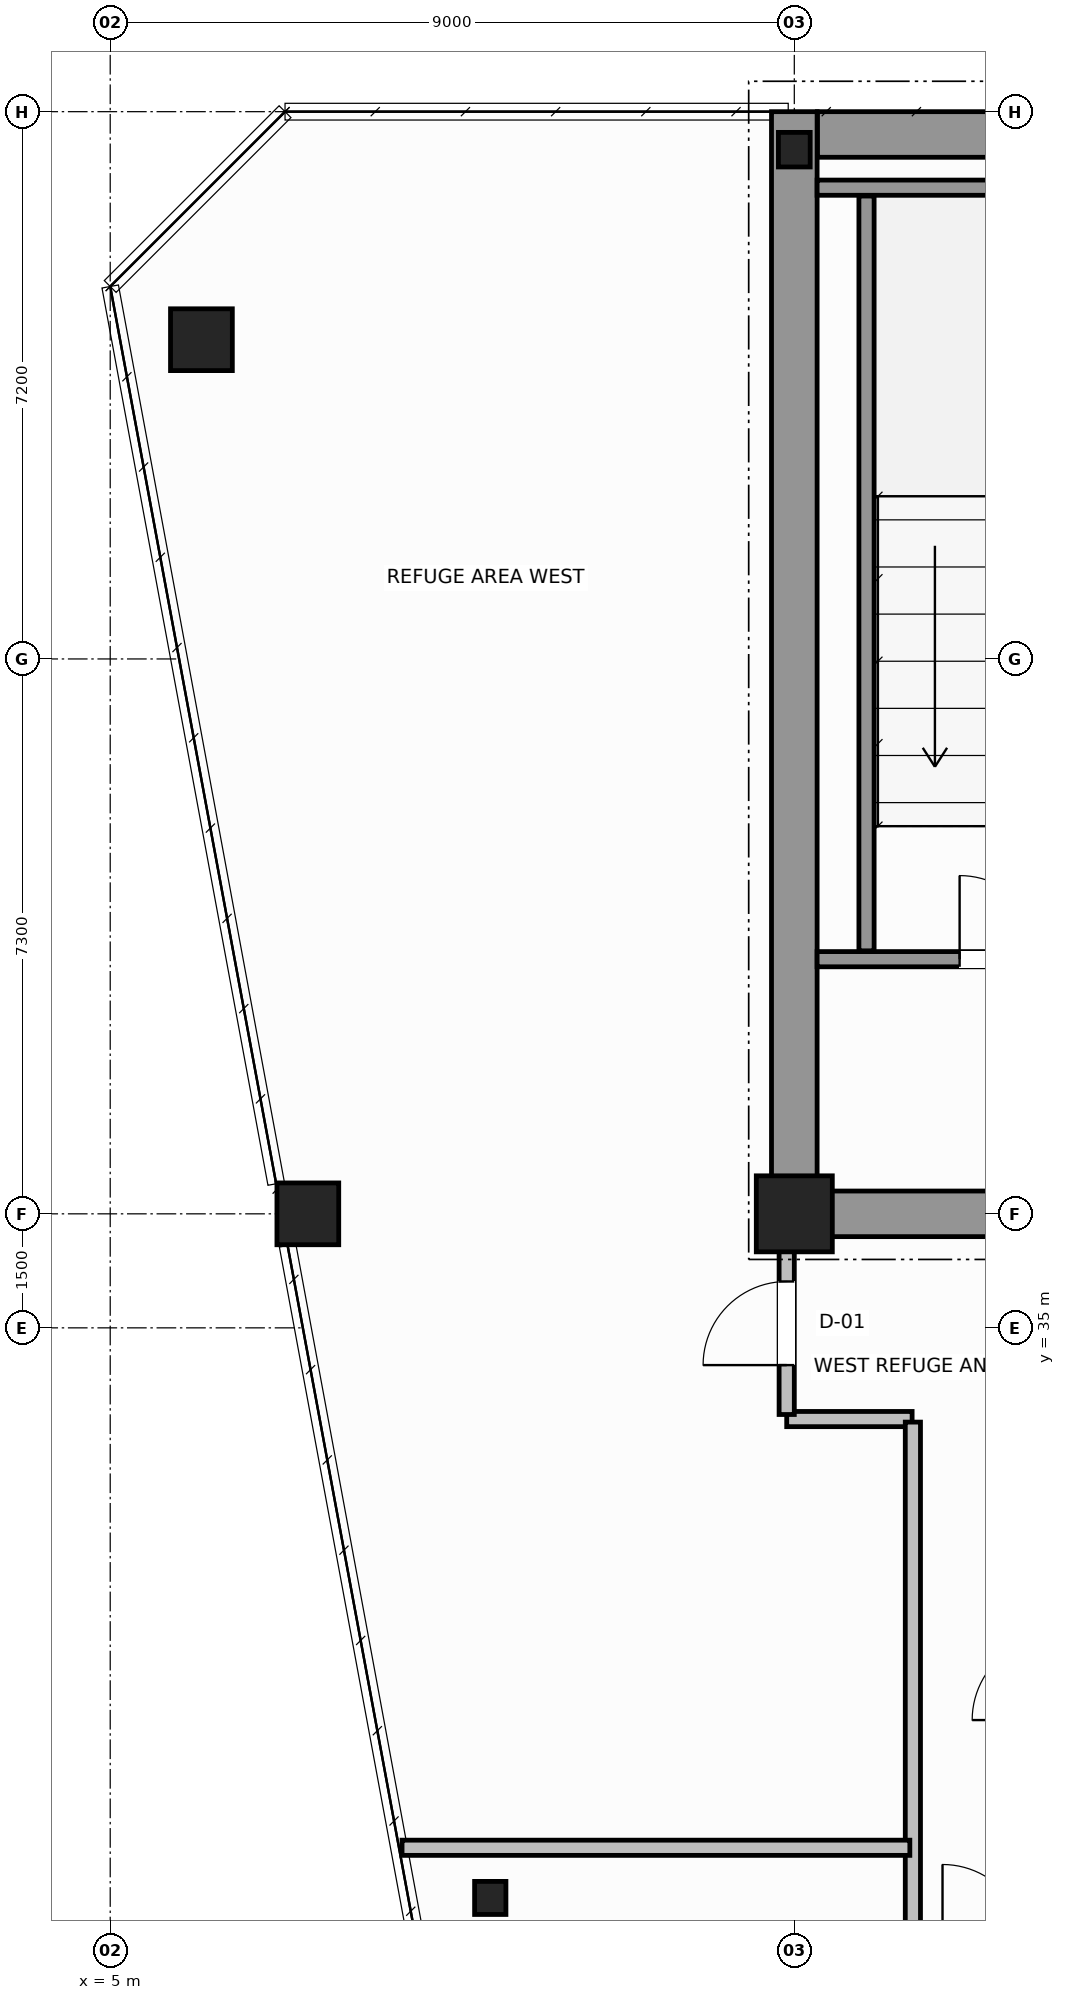
"""IFC4 building model, lengths in metres.
Left out: names, types, materials, properties, quantities, classifications, styles, units other than length and angle.
Written with IfcOpenShell. Run it as: python <this file> out.ifc"""

import sys

from ifc_helpers import new_model, si_unit, direction, frame, frame_2d, origin, origin_2d, place, context, subcontext, project, spatial, rectangle, hollow_circle, i_section, extrude, source, transform, mapped, element, fill, save


model = new_model("IFC4")
c1 = context("Model", 3, precision=1e-05, world=origin(), true_north=direction((0.0, 1.0)))
c2 = subcontext(c1, "Body", "Model", "MODEL_VIEW")
j1 = project(units=[si_unit("LENGTHUNIT", "METRE"), si_unit("PLANEANGLEUNIT", "RADIAN")], contexts=[c1])
p1 = place(None, origin())
s1 = spatial("IfcSite", under=j1, at=p1, CompositionType="ELEMENT")
p2 = place(p1, origin())
s2 = spatial("IfcBuilding", under=s1, at=p2, CompositionType="ELEMENT")
p3 = place(p2, frame((0.0, 0.0, 218.4)))
s3 = spatial("IfcBuildingStorey", under=s2, at=p3, CompositionType="ELEMENT", Elevation=218.4)
m1 = source(origin(), c2, "Body", "SweptSolid", [
    extrude(rectangle(XDim=1.0, YDim=1.0, at=origin_2d()), origin(), (0.0, 0.0, 1.0), 4.8),
])
p4 = place(p3, frame((14.0, 36.5, 0.0), z_axis=(0.0, 0.0, 1.0), x_axis=(1.0, 0.0, 0.0)))
e1 = element("IfcColumn", 1, at=p4, inside=s3, PredefinedType="COLUMN", context=c2, shape_type="MappedRepresentation", body=[
    mapped(m1, transform((0.0, 0.0, 0.0), scale=1.0)),
])
m2 = source(origin(), c2, "Body", "SweptSolid", [
    extrude(i_section(OverallWidth=0.418, OverallDepth=0.455, WebThickness=0.042, FlangeThickness=0.058, FilletRadius=0.015, at=origin_2d()), origin(), (0.0, 0.0, 1.0), 4.8),
])
p5 = place(p3, frame((14.0, 50.5, 0.0), z_axis=(0.0, 0.0, 1.0), x_axis=(1.0, 0.0, 0.0)))
e2 = element("IfcColumn", 2, at=p5, inside=s3, PredefinedType="COLUMN", context=c2, shape_type="MappedRepresentation", body=[
    mapped(m2, transform((0.0, 0.0, 0.0), scale=1.0)),
])
m3 = source(origin(), c2, "Body", "SweptSolid", [
    extrude(hollow_circle(Radius=0.406, WallThickness=0.04, at=origin_2d()), origin(), (0.0, 0.0, 1.0), 4.8),
])
for number, where, z_axis, x_axis in (
    (3, (6.2, 48.0, 0.0), (0.0, 0.0, 1.0), (1.0, 0.0, 0.0)),
    (4, (7.6, 36.5, 0.0), (0.0, 0.0, 1.0), (1.0, 0.0, 0.0)),
):
    element("IfcColumn", number, at=place(p3, frame(where, z_axis=z_axis, x_axis=x_axis)), inside=s3, PredefinedType="COLUMN", context=c2, shape_type="MappedRepresentation", body=[
        mapped(m3, transform((0.0, 0.0, 0.0), scale=1.0)),
    ])
m4 = source(origin(), c2, "Body", "SweptSolid", [
    extrude(i_section(OverallWidth=0.412, OverallDepth=0.435, WebThickness=0.036, FlangeThickness=0.05, FilletRadius=0.015, at=origin_2d()), origin(), (0.0, 0.0, 1.0), 4.8),
])
p6 = place(p3, frame((10.0, 27.5, 0.0), z_axis=(0.0, 0.0, 1.0), x_axis=(1.0, 0.0, 0.0)))
e5 = element("IfcColumn", 5, at=p6, inside=s3, PredefinedType="COLUMN", context=c2, shape_type="MappedRepresentation", body=[
    mapped(m4, transform((0.0, 0.0, 0.0), scale=1.0)),
])
p7 = place(p3, frame((14.304, 50.7, 0.0), z_axis=(0.0, 0.0, 1.0), x_axis=(1.0, 0.0, 0.0)))
e6 = element("IfcWall", 6, at=p7, inside=s3, PredefinedType="SHEAR", context=c2, shape_type="SweptSolid", body=[
    extrude(rectangle(XDim=19.694, YDim=0.6, at=frame_2d((9.847, 0.0))), origin(), (0.0, 0.0, 1.0), 4.8),
])
p8 = place(p3, frame((14.0, 36.5, 0.0), z_axis=(0.0, 0.0, 1.0), x_axis=(0.0, 1.0, 0.0)))
e7 = element("IfcWall", 7, at=p8, inside=s3, PredefinedType="SHEAR", context=c2, shape_type="SweptSolid", body=[
    extrude(rectangle(XDim=14.5, YDim=0.6, at=frame_2d((7.25, 0.0))), origin(), (0.0, 0.0, 1.0), 4.8),
])
p9 = place(p3, frame((14.32, 36.5, 0.0), z_axis=(0.0, 0.0, 1.0), x_axis=(1.0, 0.0, 0.0)))
e8 = element("IfcWall", 8, at=p9, inside=s3, PredefinedType="SHEAR", context=c2, shape_type="SweptSolid", body=[
    extrude(rectangle(XDim=3.88, YDim=0.6, at=frame_2d((1.94, 0.0))), origin(), (0.0, 0.0, 1.0), 3.54),
])
p10 = place(p3, frame((14.3, 39.85, 0.0), z_axis=(0.0, 0.0, 1.0), x_axis=(1.0, 0.0, 0.0)))
e9 = element("IfcWall", 9, at=p10, inside=s3, PredefinedType="SOLIDWALL", context=c2, shape_type="SweptSolid", body=[
    extrude(rectangle(XDim=4.3, YDim=0.2, at=frame_2d((2.15, 0.0))), origin(), (0.0, 0.0, 1.0), 4.8),
])
p11 = place(p10, frame((1.875, 0.0, 0.0)))
e10 = element("IfcOpeningElement", 10, at=p11, cuts=e9, PredefinedType="OPENING", context=c2, shape_type="SweptSolid", body=[
    extrude(rectangle(XDim=1.1, YDim=2.15, at=frame_2d((0.55, 1.075))), frame((0.0, 0.11, 0.0), z_axis=(0.0, -1.0, 0.0), x_axis=(1.0, 0.0, 0.0)), (0.0, 0.0, 1.0), 0.22),
])
p12 = place(p3, frame((14.3, 50.0, 0.0), z_axis=(0.0, 0.0, 1.0), x_axis=(1.0, 0.0, 0.0)))
e11 = element("IfcWall", 11, at=p12, inside=s3, PredefinedType="SOLIDWALL", context=c2, shape_type="SweptSolid", body=[
    extrude(rectangle(XDim=4.3, YDim=0.2, at=frame_2d((2.15, 0.0))), origin(), (0.0, 0.0, 1.0), 4.8),
])
p13 = place(p3, frame((14.95, 39.96, 0.0), z_axis=(0.0, 0.0, 1.0), x_axis=(0.0, 1.0, 0.0)))
e12 = element("IfcWall", 12, at=p13, inside=s3, PredefinedType="SOLIDWALL", context=c2, shape_type="SweptSolid", body=[
    extrude(rectangle(XDim=9.93, YDim=0.2, at=frame_2d((4.965, 0.0))), origin(), (0.0, 0.0, 1.0), 4.8),
])
p14 = place(p3, frame((13.9, 33.8, 0.0), z_axis=(0.0, 0.0, 1.0), x_axis=(1.0, 0.0, 0.0)))
e13 = element("IfcWall", 13, at=p14, inside=s3, PredefinedType="SOLIDWALL", context=c2, shape_type="SweptSolid", body=[
    extrude(rectangle(XDim=1.65, YDim=0.2, at=frame_2d((0.825, 0.0))), origin(), (0.0, 0.0, 1.0), 4.13),
])
p15 = place(p3, frame((13.9, 33.86, 0.0), z_axis=(0.0, 0.0, 1.0), x_axis=(0.0, 1.0, 0.0)))
e14 = element("IfcWall", 14, at=p15, inside=s3, PredefinedType="SOLIDWALL", context=c2, shape_type="SweptSolid", body=[
    extrude(rectangle(XDim=2.58, YDim=0.2, at=frame_2d((1.29, 0.0))), origin(), (0.0, 0.0, 1.0), 4.54),
])
p16 = place(p15, frame((0.65, 0.0, 0.0)))
e15 = element("IfcOpeningElement", 15, at=p16, cuts=e14, PredefinedType="OPENING", context=c2, shape_type="SweptSolid", body=[
    extrude(rectangle(XDim=1.1, YDim=2.15, at=frame_2d((0.55, 1.075))), frame((0.0, 0.11, 0.0), z_axis=(0.0, -1.0, 0.0), x_axis=(1.0, 0.0, 0.0)), (0.0, 0.0, 1.0), 0.22),
])
p17 = place(p3, frame((15.56, 26.84, 0.0), z_axis=(0.0, 0.0, 1.0), x_axis=(0.0, 1.0, 0.0)))
e16 = element("IfcWall", 16, at=p17, inside=s3, PredefinedType="SOLIDWALL", context=c2, shape_type="SweptSolid", body=[
    extrude(rectangle(XDim=6.92, YDim=0.2, at=frame_2d((3.46, 0.0))), origin(), (0.0, 0.0, 1.0), 4.54),
])
p18 = place(p3, frame((8.839, 28.16, 0.0), z_axis=(0.0, 0.0, 1.0), x_axis=(1.0, 0.0, 0.0)))
e17 = element("IfcWall", 17, at=p18, inside=s3, PredefinedType="SOLIDWALL", context=c2, shape_type="SweptSolid", body=[
    extrude(rectangle(XDim=6.681, YDim=0.2, at=frame_2d((3.34, 0.0))), origin(), (0.0, 0.0, 1.0), 4.54),
])
m5 = source(origin(), c2, "Body", "SweptSolid", [
    extrude(rectangle(XDim=1.1, YDim=2.15, at=frame_2d((0.55, 1.075))), frame((0.0, 0.025, 0.0), z_axis=(0.0, -1.0, 0.0), x_axis=(1.0, 0.0, 0.0)), (0.0, 0.0, 1.0), 0.05),
])
p19 = place(p11, origin())
e18 = element("IfcDoor", 18, at=p19, inside=s3, OperationType="SINGLE_SWING_LEFT", PredefinedType="DOOR", context=c2, shape_type="MappedRepresentation", body=[
    mapped(m5, transform((0.0, 0.0, 0.0), scale=1.0)),
])
fill(e10, e18)
p20 = place(p16, origin())
e19 = element("IfcDoor", 19, at=p20, inside=s3, OperationType="SINGLE_SWING_LEFT", PredefinedType="DOOR", context=c2, shape_type="MappedRepresentation", body=[
    mapped(m5, transform((0.0, 0.0, 0.0), scale=1.0)),
])
fill(e15, e19)
save(model, sys.argv[1])
